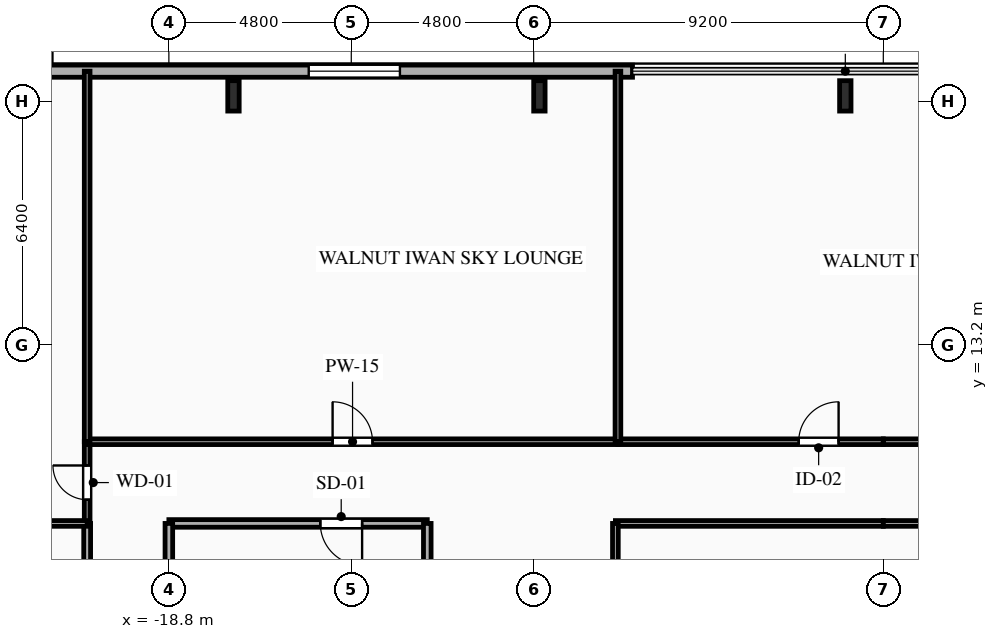
"""IFC4 building model, lengths in metres.
Left out: names, types, materials, properties, quantities, classifications, styles, units other than length and angle.
Written with IfcOpenShell. Run it as: python <this file> out.ifc"""

import sys

from ifc_helpers import new_model, si_unit, direction, frame, frame_2d, origin, origin_2d, place, context, subcontext, project, spatial, rectangle, i_section, extrude, element, fill, save


model = new_model("IFC4")
c1 = context("Model", 3, precision=1e-05, world=origin(), true_north=direction((0.0, 1.0)))
c2 = subcontext(c1, "Body", "Model", "MODEL_VIEW")
j1 = project(units=[si_unit("LENGTHUNIT", "METRE"), si_unit("PLANEANGLEUNIT", "RADIAN")], contexts=[c1])
p1 = place(None, origin())
s1 = spatial("IfcSite", under=j1, at=p1, CompositionType="ELEMENT")
p2 = place(p1, origin())
s2 = spatial("IfcBuilding", under=s1, at=p2, CompositionType="ELEMENT")
p3 = place(p2, frame((0.0, 0.0, 147.75)))
s3 = spatial("IfcBuildingStorey", under=s2, at=p3, CompositionType="ELEMENT", Elevation=147.75)
for number, where, z_axis, x_axis in (
    (1, (-1.0, 19.75, 0.0), (0.0, 0.0, 1.0), (1.0, 0.0, 0.0)),
    (2, (-9.05, 19.75, 0.0), (0.0, 0.0, 1.0), (1.0, 0.0, 0.0)),
    (3, (-17.1, 19.75, 0.0), (0.0, 0.0, 1.0), (1.0, 0.0, 0.0)),
):
    element("IfcColumn", number, at=place(p3, frame(where, z_axis=z_axis, x_axis=x_axis)), inside=s3, PredefinedType="COLUMN", context=c2, shape_type="SweptSolid", body=[
        extrude(i_section(OverallWidth=0.3, OverallDepth=0.8, WebThickness=0.018, FlangeThickness=0.033, FilletRadius=0.03, at=origin_2d()), origin(), (0.0, 0.0, 1.0), 3.35),
    ])
p4 = place(p3, frame((-25.8, 20.4, 0.0), z_axis=(0.0, 0.0, 1.0), x_axis=(1.0, 0.0, 0.0)))
e4 = element("IfcWall", 4, at=p4, inside=s3, PredefinedType="SOLIDWALL", context=c2, shape_type="SweptSolid", body=[
    extrude(rectangle(XDim=19.2, YDim=0.32, at=frame_2d((9.6, 0.0))), origin(), (0.0, 0.0, 1.0), 3.04),
])
p5 = place(p4, frame((2.135, 0.0, 0.85)))
e5 = element("IfcOpeningElement", 5, at=p5, cuts=e4, PredefinedType="OPENING", context=c2, shape_type="SweptSolid", body=[
    extrude(rectangle(XDim=1.65, YDim=1.85, at=frame_2d((0.825, 0.925))), frame((0.0, 0.17, 0.0), z_axis=(0.0, -1.0, 0.0), x_axis=(1.0, 0.0, 0.0)), (0.0, 0.0, 1.0), 0.34),
])
p6 = place(p4, frame((10.68, 0.0, 0.85)))
e6 = element("IfcOpeningElement", 6, at=p6, cuts=e4, PredefinedType="OPENING", context=c2, shape_type="SweptSolid", body=[
    extrude(rectangle(XDim=2.4, YDim=1.95, at=frame_2d((1.2, 0.975))), frame((0.0, 0.17, 0.0), z_axis=(0.0, -1.0, 0.0), x_axis=(1.0, 0.0, 0.0)), (0.0, 0.0, 1.0), 0.34),
])
p7 = place(p3, frame((-12.0, 8.5, 0.0), z_axis=(0.0, 0.0, 1.0), x_axis=(-1.0, 0.0, 0.0)))
e7 = element("IfcWall", 7, at=p7, inside=s3, PredefinedType="PARTITIONING", context=c2, shape_type="SweptSolid", body=[
    extrude(rectangle(XDim=6.8, YDim=0.2, at=frame_2d((3.4, 0.0))), origin(), (0.0, 0.0, 1.0), 3.04),
])
p8 = place(p7, frame((1.715, 0.0, 0.0)))
e8 = element("IfcOpeningElement", 8, at=p8, cuts=e7, PredefinedType="OPENING", context=c2, shape_type="SweptSolid", body=[
    extrude(rectangle(XDim=1.1, YDim=2.15, at=frame_2d((0.55, 1.075))), frame((0.0, 0.11, 0.0), z_axis=(0.0, -1.0, 0.0), x_axis=(1.0, 0.0, 0.0)), (0.0, 0.0, 1.0), 0.22),
])
p9 = place(p3, frame((-18.8, 8.5, 0.0), z_axis=(0.0, 0.0, 1.0), x_axis=(0.0, -1.0, 0.0)))
e9 = element("IfcWall", 9, at=p9, inside=s3, PredefinedType="PARTITIONING", context=c2, shape_type="SweptSolid", body=[
    extrude(rectangle(XDim=2.9, YDim=0.2, at=frame_2d((1.45, 0.0))), origin(), (0.0, 0.0, 1.0), 2.525),
])
p10 = place(p3, frame((-12.0, 5.6, 0.0), z_axis=(0.0, 0.0, 1.0), x_axis=(0.0, 1.0, 0.0)))
e10 = element("IfcWall", 10, at=p10, inside=s3, PredefinedType="PARTITIONING", context=c2, shape_type="SweptSolid", body=[
    extrude(rectangle(XDim=2.9, YDim=0.2, at=frame_2d((1.45, 0.0))), origin(), (0.0, 0.0, 1.0), 3.04),
])
p11 = place(p3, frame((-20.95, 8.5, 0.0), z_axis=(0.0, 0.0, 1.0), x_axis=(0.0, 1.0, 0.0)))
e11 = element("IfcWall", 11, at=p11, inside=s3, PredefinedType="PARTITIONING", context=c2, shape_type="SweptSolid", body=[
    extrude(rectangle(XDim=2.15, YDim=0.15, at=frame_2d((1.075, 0.0))), origin(), (0.0, 0.0, 1.0), 3.04),
])
p12 = place(p11, frame((0.625, 0.0, 0.0)))
e12 = element("IfcOpeningElement", 12, at=p12, cuts=e11, PredefinedType="OPENING", context=c2, shape_type="SweptSolid", body=[
    extrude(rectangle(XDim=0.9, YDim=2.1, at=frame_2d((0.45, 1.05))), frame((0.0, 0.085, 0.0), z_axis=(0.0, -1.0, 0.0), x_axis=(1.0, 0.0, 0.0)), (0.0, 0.0, 1.0), 0.17),
])
p13 = place(p3, frame((-20.95, 10.65, 0.0), z_axis=(0.0, 0.0, 1.0), x_axis=(1.0, 0.0, 0.0)))
e13 = element("IfcWall", 13, at=p13, inside=s3, PredefinedType="PARTITIONING", context=c2, shape_type="SweptSolid", body=[
    extrude(rectangle(XDim=13.967, YDim=0.15, at=frame_2d((6.983, 0.0))), origin(), (0.0, 0.0, 1.0), 3.04),
])
p14 = place(p13, frame((6.458, 0.0, 0.0)))
e14 = element("IfcOpeningElement", 14, at=p14, cuts=e13, PredefinedType="OPENING", context=c2, shape_type="SweptSolid", body=[
    extrude(rectangle(XDim=1.05, YDim=2.15, at=frame_2d((0.525, 1.075))), frame((0.0, 0.085, 0.0), z_axis=(0.0, -1.0, 0.0), x_axis=(1.0, 0.0, 0.0)), (0.0, 0.0, 1.0), 0.17),
])
p15 = place(p3, frame((-6.983, 10.65, 0.0), z_axis=(0.0, 0.0, 1.0), x_axis=(1.0, 0.0, 0.0)))
e15 = element("IfcWall", 15, at=p15, inside=s3, PredefinedType="PARTITIONING", context=c2, shape_type="SweptSolid", body=[
    extrude(rectangle(XDim=6.983, YDim=0.15, at=frame_2d((3.491, 0.0))), origin(), (0.0, 0.0, 1.0), 3.04),
])
p16 = place(p15, frame((4.756, 0.0, 0.0)))
e16 = element("IfcOpeningElement", 16, at=p16, cuts=e15, PredefinedType="OPENING", context=c2, shape_type="SweptSolid", body=[
    extrude(rectangle(XDim=1.05, YDim=2.15, at=frame_2d((0.525, 1.075))), frame((0.0, 0.085, 0.0), z_axis=(0.0, -1.0, 0.0), x_axis=(1.0, 0.0, 0.0)), (0.0, 0.0, 1.0), 0.17),
])
p17 = place(p3, frame((0.0, 8.5, 0.0), z_axis=(0.0, 0.0, 1.0), x_axis=(-1.0, 0.0, 0.0)))
e17 = element("IfcWall", 17, at=p17, inside=s3, PredefinedType="PARTITIONING", context=c2, shape_type="SweptSolid", body=[
    extrude(rectangle(XDim=7.05, YDim=0.15, at=frame_2d((3.525, 0.0))), origin(), (0.0, 0.0, 1.0), 3.04),
])
p18 = place(p3, frame((0.0, 10.65, 0.0), z_axis=(0.0, 0.0, 1.0), x_axis=(1.0, 0.0, 0.0)))
e18 = element("IfcWall", 18, at=p18, inside=s3, PredefinedType="PARTITIONING", context=c2, shape_type="SweptSolid", body=[
    extrude(rectangle(XDim=6.983, YDim=0.15, at=frame_2d((3.491, 0.0))), origin(), (0.0, 0.0, 1.0), 3.04),
])
p19 = place(p3, frame((7.05, 8.5, 0.0), z_axis=(0.0, 0.0, 1.0), x_axis=(-1.0, 0.0, 0.0)))
e19 = element("IfcWall", 19, at=p19, inside=s3, PredefinedType="PARTITIONING", context=c2, shape_type="SweptSolid", body=[
    extrude(rectangle(XDim=7.05, YDim=0.15, at=frame_2d((3.525, 0.0))), origin(), (0.0, 0.0, 1.0), 3.04),
])
p20 = place(p3, frame((-20.95, -5.6, 0.0), z_axis=(0.0, 0.0, 1.0), x_axis=(0.0, 1.0, 0.0)))
e20 = element("IfcWall", 20, at=p20, inside=s3, PredefinedType="PARTITIONING", context=c2, shape_type="SweptSolid", body=[
    extrude(rectangle(XDim=14.1, YDim=0.18, at=frame_2d((7.05, 0.0))), origin(), (0.0, 0.0, 1.0), 3.04),
])
p21 = place(p20, frame((5.058, 0.0, 0.0)))
e21 = element("IfcOpeningElement", 21, at=p21, cuts=e20, PredefinedType="OPENING", context=c2, shape_type="SweptSolid", body=[
    extrude(rectangle(XDim=1.0, YDim=2.15, at=frame_2d((0.5, 1.075))), frame((0.0, 0.1, 0.0), z_axis=(0.0, -1.0, 0.0), x_axis=(1.0, 0.0, 0.0)), (0.0, 0.0, 1.0), 0.2),
])
p22 = place(p3, frame((-7.05, 8.5, 0.0), z_axis=(0.0, 0.0, 1.0), x_axis=(0.0, -1.0, 0.0)))
e22 = element("IfcWall", 22, at=p22, inside=s3, PredefinedType="PARTITIONING", context=c2, shape_type="SweptSolid", body=[
    extrude(rectangle(XDim=9.3, YDim=0.15, at=frame_2d((4.65, 0.0))), origin(), (0.0, 0.0, 1.0), 3.04),
])
p23 = place(p3, frame((-23.6, 8.5, 0.0), z_axis=(0.0, 0.0, 1.0), x_axis=(1.0, 0.0, 0.0)))
e23 = element("IfcWall", 23, at=p23, inside=s3, PredefinedType="PARTITIONING", context=c2, shape_type="SweptSolid", body=[
    extrude(rectangle(XDim=2.65, YDim=0.15, at=frame_2d((1.325, 0.0))), origin(), (0.0, 0.0, 1.0), 3.04),
])
p24 = place(p23, frame((0.635, 0.0, 0.0)))
e24 = element("IfcOpeningElement", 24, at=p24, cuts=e23, PredefinedType="OPENING", context=c2, shape_type="SweptSolid", body=[
    extrude(rectangle(XDim=1.05, YDim=2.15, at=frame_2d((0.525, 1.075))), frame((0.0, 0.085, 0.0), z_axis=(0.0, -1.0, 0.0), x_axis=(1.0, 0.0, 0.0)), (0.0, 0.0, 1.0), 0.17),
])
for number, where, z_axis, x_axis in (
    (25, (-20.95, 20.4, 0.0), (0.0, 0.0, 1.0), (0.0, -1.0, 0.0)),
    (26, (-6.983, 20.4, 0.0), (0.0, 0.0, 1.0), (0.0, -1.0, 0.0)),
):
    element("IfcWall", number, at=place(p3, frame(where, z_axis=z_axis, x_axis=x_axis)), inside=s3, PredefinedType="PARTITIONING", context=c2, shape_type="SweptSolid", body=[
        extrude(rectangle(XDim=9.75, YDim=0.15, at=frame_2d((4.875, 0.0))), origin(), (0.0, 0.0, 1.0), 3.04),
    ])
p25 = place(p6, origin())
e27 = element("IfcWindow", 27, at=p25, inside=s3, PartitioningType="SINGLE_PANEL", PredefinedType="WINDOW", context=c2, shape_type="SweptSolid", body=[
    extrude(rectangle(XDim=2.4, YDim=1.95, at=frame_2d((1.2, 0.975))), frame((0.0, 0.03, 0.0), z_axis=(0.0, -1.0, 0.0), x_axis=(1.0, 0.0, 0.0)), (0.0, 0.0, 1.0), 0.06),
])
fill(e6, e27)
p26 = place(p8, origin())
e28 = element("IfcDoor", 28, at=p26, inside=s3, OperationType="SINGLE_SWING_LEFT", PredefinedType="DOOR", context=c2, shape_type="SweptSolid", body=[
    extrude(rectangle(XDim=1.1, YDim=2.15, at=frame_2d((0.55, 1.075))), frame((0.0, 0.025, 0.0), z_axis=(0.0, -1.0, 0.0), x_axis=(1.0, 0.0, 0.0)), (0.0, 0.0, 1.0), 0.05),
])
fill(e8, e28)
p27 = place(p12, origin())
e29 = element("IfcDoor", 29, at=p27, inside=s3, OperationType="SINGLE_SWING_RIGHT", PredefinedType="DOOR", context=c2, shape_type="SweptSolid", body=[
    extrude(rectangle(XDim=0.9, YDim=2.1, at=frame_2d((0.45, 1.05))), frame((0.0, 0.025, 0.0), z_axis=(0.0, -1.0, 0.0), x_axis=(1.0, 0.0, 0.0)), (0.0, 0.0, 1.0), 0.05),
])
fill(e12, e29)
p28 = place(p14, origin())
e30 = element("IfcDoor", 30, at=p28, inside=s3, OperationType="SINGLE_SWING_LEFT", PredefinedType="DOOR", context=c2, shape_type="SweptSolid", body=[
    extrude(rectangle(XDim=1.05, YDim=2.15, at=frame_2d((0.525, 1.075))), frame((0.0, 0.025, 0.0), z_axis=(0.0, -1.0, 0.0), x_axis=(1.0, 0.0, 0.0)), (0.0, 0.0, 1.0), 0.05),
])
fill(e14, e30)
p29 = place(p16, origin())
e31 = element("IfcDoor", 31, at=p29, inside=s3, OperationType="SINGLE_SWING_RIGHT", PredefinedType="DOOR", context=c2, shape_type="SweptSolid", body=[
    extrude(rectangle(XDim=1.05, YDim=2.15, at=frame_2d((0.525, 1.075))), frame((0.0, 0.025, 0.0), z_axis=(0.0, -1.0, 0.0), x_axis=(1.0, 0.0, 0.0)), (0.0, 0.0, 1.0), 0.05),
])
fill(e16, e31)
save(model, sys.argv[1])
